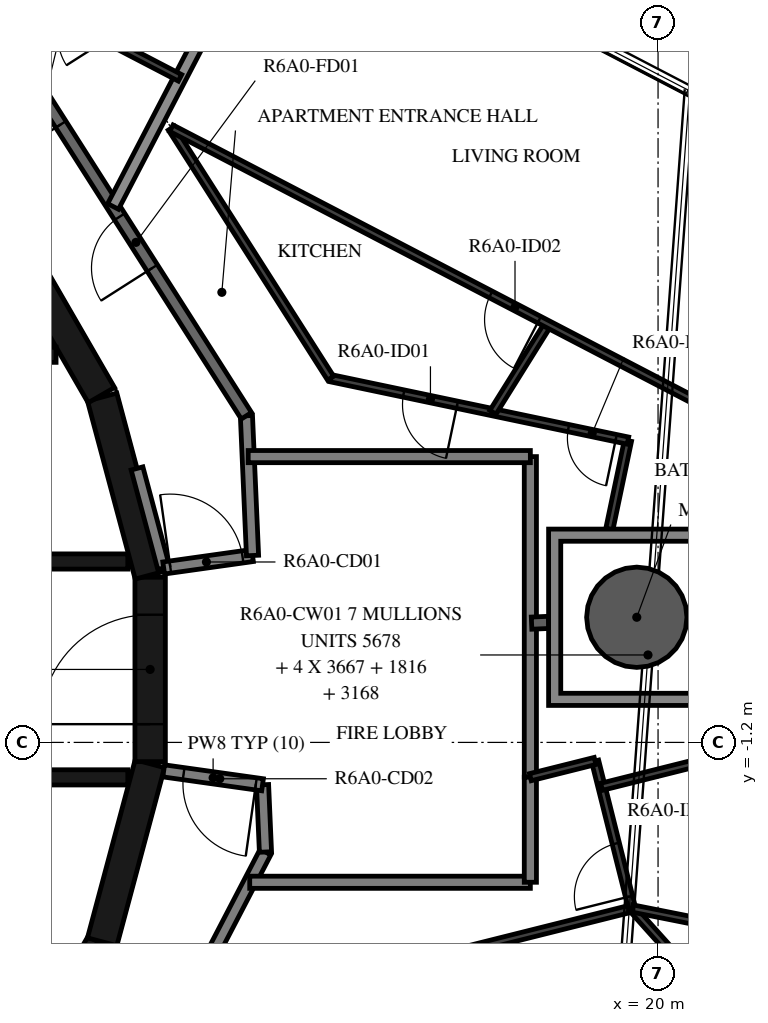
"""IFC4 building model, lengths in metres.
Left out: names, types, materials, properties, quantities, classifications, styles, units other than length and angle.
Written with IfcOpenShell. Run it as: python <this file> out.ifc"""

import sys

from ifc_helpers import new_model, si_unit, direction, frame, frame_2d, origin, origin_2d, place, context, subcontext, project, spatial, polyline, rectangle, hollow_circle, outline, extrude, element, fill, save


model = new_model("IFC4")
c1 = context("Model", 3, precision=1e-05, world=origin(), true_north=direction((0.0, 1.0)))
c2 = subcontext(c1, "Body", "Model", "MODEL_VIEW")
j1 = project(units=[si_unit("LENGTHUNIT", "METRE"), si_unit("PLANEANGLEUNIT", "RADIAN")], contexts=[c1])
p1 = place(None, origin())
s1 = spatial("IfcSite", under=j1, at=p1, CompositionType="ELEMENT")
p2 = place(p1, origin())
s2 = spatial("IfcBuilding", under=s1, at=p2, CompositionType="ELEMENT")
p3 = place(p2, frame((0.0, 0.0, 233.7)))
s3 = spatial("IfcBuildingStorey", under=s2, at=p3, CompositionType="ELEMENT", Elevation=233.7)
p4 = place(p3, frame((19.65, 0.858, -0.38), z_axis=(0.0, 0.0, 1.0), x_axis=(1.0, 0.0, 0.0)))
e1 = element("IfcColumn", 1, at=p4, inside=s3, PredefinedType="COLUMN", context=c2, shape_type="SweptSolid", body=[
    extrude(hollow_circle(Radius=0.825, WallThickness=0.04, at=origin_2d()), origin(), (0.0, 0.0, 1.0), 3.5),
])
for number, where, z_axis, x_axis in (
    (2, (9.329, -7.137, 0.0), (0.0, 0.0, 1.0), (0.5, 0.866, 0.0)),
    (3, (10.858, -4.479, 0.0), (0.0, 0.0, 1.0), (0.259, 0.966, 0.0)),
):
    element("IfcWall", number, at=place(p3, frame(where, z_axis=z_axis, x_axis=x_axis)), inside=s3, PredefinedType="SHEAR", context=c2, shape_type="SweptSolid", body=[
        extrude(rectangle(XDim=3.033, YDim=0.5, at=frame_2d((1.516, 0.0))), origin(), (0.0, 0.0, 1.0), 3.12),
    ])
p5 = place(p3, frame((11.647, -1.516, 0.0), z_axis=(0.0, 0.0, 1.0), x_axis=(0.0, 1.0, 0.0)))
e4 = element("IfcWall", 4, at=p5, inside=s3, PredefinedType="SHEAR", context=c2, shape_type="SweptSolid", body=[
    extrude(rectangle(XDim=3.033, YDim=0.5, at=frame_2d((1.516, 0.0))), origin(), (0.0, 0.0, 1.0), 3.12),
])
p6 = place(p5, frame((0.616, 0.0, 0.0)))
e5 = element("IfcOpeningElement", 5, at=p6, cuts=e4, PredefinedType="OPENING", context=c2, shape_type="SweptSolid", body=[
    extrude(rectangle(XDim=1.8, YDim=2.1, at=frame_2d((0.9, 1.05))), frame((0.0, 0.26, 0.0), z_axis=(0.0, -1.0, 0.0), x_axis=(1.0, 0.0, 0.0)), (0.0, 0.0, 1.0), 0.52),
])
for number, where, z_axis, x_axis in (
    (6, (11.643, 1.55, 0.0), (0.0, 0.0, 1.0), (-0.259, 0.966, 0.0)),
    (7, (10.845, 4.51, 0.0), (0.0, 0.0, 1.0), (-0.5, 0.866, 0.0)),
):
    element("IfcWall", number, at=place(p3, frame(where, z_axis=z_axis, x_axis=x_axis)), inside=s3, PredefinedType="SHEAR", context=c2, shape_type="SweptSolid", body=[
        extrude(rectangle(XDim=3.033, YDim=0.5, at=frame_2d((1.516, 0.0))), origin(), (0.0, 0.0, 1.0), 3.12),
    ])
p7 = place(p3, frame((7.0, 5.175, 0.0), z_axis=(0.0, 0.0, 1.0), x_axis=(1.0, 0.0, 0.0)))
e8 = element("IfcWall", 8, at=p7, inside=s3, PredefinedType="SHEAR", context=c2, shape_type="SweptSolid", body=[
    extrude(rectangle(XDim=3.1, YDim=0.25, at=frame_2d((1.55, 0.0))), origin(), (0.0, 0.0, 1.0), 3.12),
])
p8 = place(p3, frame((3.35, 1.775, 0.0), z_axis=(0.0, 0.0, 1.0), x_axis=(1.0, 0.0, 0.0)))
e9 = element("IfcWall", 9, at=p8, inside=s3, PredefinedType="SHEAR", context=c2, shape_type="SweptSolid", body=[
    extrude(rectangle(XDim=7.93, YDim=0.25, at=frame_2d((3.965, 0.0))), origin(), (0.0, 0.0, 1.0), 3.12),
])
p9 = place(p8, frame((0.35, 0.0, 0.0)))
e10 = element("IfcOpeningElement", 10, at=p9, cuts=e9, PredefinedType="OPENING", context=c2, shape_type="SweptSolid", body=[
    extrude(rectangle(XDim=1.2, YDim=2.4, at=frame_2d((0.6, 1.2))), frame((0.0, 0.135, 0.0), z_axis=(0.0, -1.0, 0.0), x_axis=(1.0, 0.0, 0.0)), (0.0, 0.0, 1.0), 0.27),
])
p10 = place(p8, frame((2.5, 0.0, 0.0)))
e11 = element("IfcOpeningElement", 11, at=p10, cuts=e9, PredefinedType="OPENING", context=c2, shape_type="SweptSolid", body=[
    extrude(rectangle(XDim=1.2, YDim=2.4, at=frame_2d((0.6, 1.2))), frame((0.0, 0.135, 0.0), z_axis=(0.0, -1.0, 0.0), x_axis=(1.0, 0.0, 0.0)), (0.0, 0.0, 1.0), 0.27),
])
p11 = place(p8, frame((4.8, 0.0, 0.0)))
e12 = element("IfcOpeningElement", 12, at=p11, cuts=e9, PredefinedType="OPENING", context=c2, shape_type="SweptSolid", body=[
    extrude(rectangle(XDim=0.9, YDim=2.1, at=frame_2d((0.45, 1.05))), frame((0.0, 0.135, 0.0), z_axis=(0.0, -1.0, 0.0), x_axis=(1.0, 0.0, 0.0)), (0.0, 0.0, 1.0), 0.27),
])
p12 = place(p3, frame((3.35, -1.775, 0.0), z_axis=(0.0, 0.0, 1.0), x_axis=(1.0, 0.0, 0.0)))
e13 = element("IfcWall", 13, at=p12, inside=s3, PredefinedType="SHEAR", context=c2, shape_type="SweptSolid", body=[
    extrude(rectangle(XDim=7.93, YDim=0.25, at=frame_2d((3.965, 0.0))), origin(), (0.0, 0.0, 1.0), 3.12),
])
p13 = place(p12, frame((0.4, 0.0, 0.0)))
e14 = element("IfcOpeningElement", 14, at=p13, cuts=e13, PredefinedType="OPENING", context=c2, shape_type="SweptSolid", body=[
    extrude(rectangle(XDim=1.1, YDim=2.4, at=frame_2d((0.55, 1.2))), frame((0.0, 0.135, 0.0), z_axis=(0.0, -1.0, 0.0), x_axis=(1.0, 0.0, 0.0)), (0.0, 0.0, 1.0), 0.27),
])
p14 = place(p12, frame((2.55, 0.0, 0.0)))
e15 = element("IfcOpeningElement", 15, at=p14, cuts=e13, PredefinedType="OPENING", context=c2, shape_type="SweptSolid", body=[
    extrude(rectangle(XDim=1.1, YDim=2.4, at=frame_2d((0.55, 1.2))), frame((0.0, 0.135, 0.0), z_axis=(0.0, -1.0, 0.0), x_axis=(1.0, 0.0, 0.0)), (0.0, 0.0, 1.0), 0.27),
])
p15 = place(p12, frame((4.7, 0.0, 0.0)))
e16 = element("IfcOpeningElement", 16, at=p15, cuts=e13, PredefinedType="OPENING", context=c2, shape_type="SweptSolid", body=[
    extrude(rectangle(XDim=1.1, YDim=2.4, at=frame_2d((0.55, 1.2))), frame((0.0, 0.135, 0.0), z_axis=(0.0, -1.0, 0.0), x_axis=(1.0, 0.0, 0.0)), (0.0, 0.0, 1.0), 0.27),
])
p16 = place(p3, frame((11.87, 1.668, 0.0), z_axis=(0.0, 0.0, 1.0), x_axis=(-0.258836880648, 0.965921047093, 0.0)))
e17 = element("IfcWall", 17, at=p16, inside=s3, PredefinedType="STANDARD", context=c2, shape_type="SweptSolid", body=[
    extrude(rectangle(XDim=1.695, YDim=0.2, at=frame_2d((0.848, 0.0))), origin(), (0.0, 0.0, 1.0), 3.12),
])
p17 = place(p3, frame((11.87, 1.668, 0.0), z_axis=(0.0, 0.0, 1.0), x_axis=(0.990267985606, 0.139173692496, 0.0)))
e18 = element("IfcWall", 18, at=p17, inside=s3, PredefinedType="STANDARD", context=c2, shape_type="SweptSolid", body=[
    extrude(rectangle(XDim=1.475, YDim=0.2, at=frame_2d((0.738, 0.0))), origin(), (0.0, 0.0, 1.0), 3.12),
])
p18 = place(p17, frame((0.11, 0.0, 0.0)))
e19 = element("IfcOpeningElement", 19, at=p18, cuts=e18, PredefinedType="OPENING", context=c2, shape_type="SweptSolid", body=[
    extrude(rectangle(XDim=1.2, YDim=2.1, at=frame_2d((0.6, 1.05))), frame((0.0, 0.11, 0.0), z_axis=(0.0, -1.0, 0.0), x_axis=(1.0, 0.0, 0.0)), (0.0, 0.0, 1.0), 0.22),
])
p19 = place(p3, frame((13.331, 1.874, 0.0), z_axis=(0.0, 0.0, 1.0), x_axis=(-0.043621457762, 0.999048131184, 0.0)))
e20 = element("IfcWall", 20, at=p19, inside=s3, PredefinedType="STANDARD", context=c2, shape_type="SweptSolid", body=[
    extrude(rectangle(XDim=2.3, YDim=0.2, at=frame_2d((1.15, 0.0))), origin(), (0.0, 0.0, 1.0), 3.12),
])
p20 = place(p3, frame((13.231, 4.172, 0.0), z_axis=(0.0, 0.0, 1.0), x_axis=(-0.537304397561, 0.843388394728, 0.0)))
e21 = element("IfcWall", 21, at=p20, inside=s3, PredefinedType="STANDARD", context=c2, shape_type="SweptSolid", body=[
    extrude(rectangle(XDim=7.181, YDim=0.2, at=frame_2d((3.59, 0.0))), origin(), (0.0, 0.0, 1.0), 3.12),
])
p21 = place(p20, frame((2.881, 0.0, 0.0)))
e22 = element("IfcOpeningElement", 22, at=p21, cuts=e21, PredefinedType="OPENING", context=c2, shape_type="SweptSolid", body=[
    extrude(rectangle(XDim=1.0, YDim=2.1, at=frame_2d((0.5, 1.05))), frame((0.0, 0.11, 0.0), z_axis=(0.0, -1.0, 0.0), x_axis=(1.0, 0.0, 0.0)), (0.0, 0.0, 1.0), 0.22),
])
p22 = place(p20, frame((5.681, 0.0, 0.0)))
e23 = element("IfcOpeningElement", 23, at=p22, cuts=e21, PredefinedType="OPENING", context=c2, shape_type="SweptSolid", body=[
    extrude(rectangle(XDim=1.0, YDim=2.1, at=frame_2d((0.5, 1.05))), frame((0.0, 0.11, 0.0), z_axis=(0.0, -1.0, 0.0), x_axis=(1.0, 0.0, 0.0)), (0.0, 0.0, 1.0), 0.22),
])
p23 = place(p3, frame((10.228, -9.372, 0.0), z_axis=(0.0, 0.0, 1.0), x_axis=(0.461759464021, 0.887005184532, 0.0)))
e24 = element("IfcWall", 24, at=p23, inside=s3, PredefinedType="STANDARD", context=c2, shape_type="SweptSolid", body=[
    extrude(rectangle(XDim=7.181, YDim=0.2, at=frame_2d((3.591, 0.0))), origin(), (0.0, 0.0, 1.0), 3.12),
])
p24 = place(p3, frame((13.544, -3.003, 0.0), z_axis=(0.0, 0.0, 1.0), x_axis=(-0.043666917606, 0.999046145234, 0.0)))
e25 = element("IfcWall", 25, at=p24, inside=s3, PredefinedType="STANDARD", context=c2, shape_type="SweptSolid", body=[
    extrude(rectangle(XDim=1.107, YDim=0.2, at=frame_2d((0.553, 0.0))), origin(), (0.0, 0.0, 1.0), 3.12),
])
p25 = place(p3, frame((13.496, -1.897, 0.0), z_axis=(0.0, 0.0, 1.0), x_axis=(-0.99026234641, 0.139213811391, 0.0)))
e26 = element("IfcWall", 26, at=p25, inside=s3, PredefinedType="STANDARD", context=c2, shape_type="SweptSolid", body=[
    extrude(rectangle(XDim=1.641, YDim=0.2, at=frame_2d((0.821, 0.0))), origin(), (0.0, 0.0, 1.0), 3.12),
])
p26 = place(p25, frame((0.11, 0.0, 0.0)))
e27 = element("IfcOpeningElement", 27, at=p26, cuts=e26, PredefinedType="OPENING", context=c2, shape_type="SweptSolid", body=[
    extrude(rectangle(XDim=1.2, YDim=2.1, at=frame_2d((0.6, 1.05))), frame((0.0, 0.11, 0.0), z_axis=(0.0, -1.0, 0.0), x_axis=(1.0, 0.0, 0.0)), (0.0, 0.0, 1.0), 0.22),
])
p27 = place(p3, frame((17.9, -1.772, 0.0), z_axis=(0.0, 0.0, 1.0), x_axis=(0.0, 1.0, 0.0)))
e28 = element("IfcWall", 28, at=p27, inside=s3, PredefinedType="STANDARD", context=c2, shape_type="SweptSolid", body=[
    extrude(rectangle(XDim=5.272, YDim=0.2, at=frame_2d((2.636, 0.0))), origin(), (0.0, 0.0, 1.0), 3.12),
])
p28 = place(p3, frame((17.9, 3.5, 0.0), z_axis=(0.0, 0.0, 1.0), x_axis=(-1.0, 0.0, 0.0)))
e29 = element("IfcWall", 29, at=p28, inside=s3, PredefinedType="STANDARD", context=c2, shape_type="SweptSolid", body=[
    extrude(rectangle(XDim=4.64, YDim=0.2, at=frame_2d((2.32, 0.0))), origin(), (0.0, 0.0, 1.0), 3.12),
])
p29 = place(p3, frame((13.285, -3.5, 0.0), z_axis=(0.0, 0.0, 1.0), x_axis=(1.0, 0.0, 0.0)))
e30 = element("IfcWall", 30, at=p29, inside=s3, PredefinedType="STANDARD", context=c2, shape_type="SweptSolid", body=[
    extrude(rectangle(XDim=4.615, YDim=0.2, at=frame_2d((2.308, 0.0))), origin(), (0.0, 0.0, 1.0), 3.12),
])
p30 = place(p3, frame((17.9, -3.5, 0.0), z_axis=(0.0, 0.0, 1.0), x_axis=(0.0, 1.0, 0.0)))
e31 = element("IfcWall", 31, at=p30, inside=s3, PredefinedType="STANDARD", context=c2, shape_type="SweptSolid", body=[
    extrude(rectangle(XDim=1.728, YDim=0.2, at=frame_2d((0.864, 0.0))), origin(), (0.0, 0.0, 1.0), 3.12),
])
p31 = place(p3, frame((13.801, 12.922, 0.0), z_axis=(0.0, 0.0, 1.0), x_axis=(-0.461726485624, -0.887022351733, 0.0)))
e32 = element("IfcWall", 32, at=p31, inside=s3, PredefinedType="STANDARD", context=c2, shape_type="SweptSolid", body=[
    extrude(rectangle(XDim=5.984, YDim=0.2, at=frame_2d((2.992, 0.0))), origin(), (0.0, 0.0, 1.0), 2.73),
])
p32 = place(p3, frame((17.92, 0.761, 0.0), z_axis=(0.0, 0.0, 1.0), x_axis=(0.999051221661, 0.04355061995, 0.0)))
e33 = element("IfcWall", 33, at=p32, inside=s3, PredefinedType="STANDARD", context=c2, shape_type="SweptSolid", body=[
    extrude(rectangle(XDim=0.28, YDim=0.2, at=frame_2d((0.14, 0.0))), origin(), (0.0, 0.0, 1.0), 3.12),
])
p33 = place(p3, frame((19.199, 2.308, 0.0), z_axis=(0.0, 0.0, 1.0), x_axis=(0.205580140246, 0.978640284239, 0.0)))
e34 = element("IfcWall", 34, at=p33, inside=s3, PredefinedType="PARTITIONING", context=c2, shape_type="SweptSolid", body=[
    extrude(rectangle(XDim=1.487, YDim=0.12, at=frame_2d((0.743, 0.0))), origin(), (0.0, 0.0, 1.0), 3.12),
])
p34 = place(p3, frame((19.505, 3.763, 0.0), z_axis=(0.0, 0.0, 1.0), x_axis=(-0.978660081285, 0.205485876157, 0.0)))
e35 = element("IfcWall", 35, at=p34, inside=s3, PredefinedType="PARTITIONING", context=c2, shape_type="SweptSolid", body=[
    extrude(rectangle(XDim=4.996, YDim=0.12, at=frame_2d((2.498, 0.0))), origin(), (0.0, 0.0, 1.0), 3.12),
])
p35 = place(p34, frame((0.2, 0.0, 0.0)))
e36 = element("IfcOpeningElement", 36, at=p35, cuts=e35, PredefinedType="OPENING", context=c2, shape_type="SweptSolid", body=[
    extrude(rectangle(XDim=0.8, YDim=2.1, at=frame_2d((0.4, 1.05))), frame((0.0, 0.07, 0.0), z_axis=(0.0, -1.0, 0.0), x_axis=(1.0, 0.0, 0.0)), (0.0, 0.0, 1.0), 0.14),
])
p36 = place(p34, frame((2.869, 0.0, 0.0)))
e37 = element("IfcOpeningElement", 37, at=p36, cuts=e35, PredefinedType="OPENING", context=c2, shape_type="SweptSolid", body=[
    extrude(rectangle(XDim=0.9, YDim=2.1, at=frame_2d((0.45, 1.05))), frame((0.0, 0.07, 0.0), z_axis=(0.0, -1.0, 0.0), x_axis=(1.0, 0.0, 0.0)), (0.0, 0.0, 1.0), 0.14),
])
p37 = place(p3, frame((14.615, 4.79, 0.0), z_axis=(0.0, 0.0, 1.0), x_axis=(-0.537312928062, 0.843382960071, 0.0)))
e38 = element("IfcWall", 38, at=p37, inside=s3, PredefinedType="PARTITIONING", context=c2, shape_type="SweptSolid", body=[
    extrude(rectangle(XDim=4.875, YDim=0.12, at=frame_2d((2.437, 0.0))), origin(), (0.0, 0.0, 1.0), 3.12),
])
p38 = place(p3, frame((18.189, 5.677, 0.0), z_axis=(0.0, 0.0, 1.0), x_axis=(-0.529639004581, -0.848223157445, 0.0)))
e39 = element("IfcWall", 39, at=p38, inside=s3, PredefinedType="PARTITIONING", context=c2, shape_type="SweptSolid", body=[
    extrude(rectangle(XDim=1.707, YDim=0.12, at=frame_2d((0.854, 0.0))), origin(), (0.0, 0.0, 1.0), 3.12),
])
p39 = place(p3, frame((21.085, 4.169, 0.0), z_axis=(0.0, 0.0, 1.0), x_axis=(-0.887017373034, 0.461736050071, 0.0)))
e40 = element("IfcWall", 40, at=p39, inside=s3, PredefinedType="PARTITIONING", context=c2, shape_type="SweptSolid", body=[
    extrude(rectangle(XDim=10.247, YDim=0.12, at=frame_2d((5.123, 0.0))), origin(), (0.0, 0.0, 1.0), 3.12),
])
p40 = place(p39, frame((3.425, 0.0, 0.0)))
e41 = element("IfcOpeningElement", 41, at=p40, cuts=e40, PredefinedType="OPENING", context=c2, shape_type="SweptSolid", body=[
    extrude(rectangle(XDim=0.9, YDim=2.1, at=frame_2d((0.45, 1.05))), frame((0.0, 0.07, 0.0), z_axis=(0.0, -1.0, 0.0), x_axis=(1.0, 0.0, 0.0)), (0.0, 0.0, 1.0), 0.14),
])
p41 = place(p3, frame((12.139, 9.729, 0.0), z_axis=(0.0, 0.0, 1.0), x_axis=(-0.887046876331, 0.461679368383, 0.0)))
e42 = element("IfcWall", 42, at=p41, inside=s3, PredefinedType="PARTITIONING", context=c2, shape_type="SweptSolid", body=[
    extrude(rectangle(XDim=1.13, YDim=0.12, at=frame_2d((0.565, 0.0))), origin(), (0.0, 0.0, 1.0), 3.12),
])
p42 = place(p3, frame((14.029, -5.32, 0.0), z_axis=(0.0, 0.0, 1.0), x_axis=(0.969999099814, 0.243108507378, 0.0)))
e43 = element("IfcWall", 43, at=p42, inside=s3, PredefinedType="PARTITIONING", context=c2, shape_type="SweptSolid", body=[
    extrude(rectangle(XDim=5.715, YDim=0.12, at=frame_2d((2.857, 0.0))), origin(), (0.0, 0.0, 1.0), 3.12),
])
p43 = place(p3, frame((19.573, -3.93, 0.0), z_axis=(0.0, 0.0, 1.0), x_axis=(-0.243155959183, 0.96998720585, 0.0)))
e44 = element("IfcWall", 44, at=p43, inside=s3, PredefinedType="PARTITIONING", context=c2, shape_type="SweptSolid", body=[
    extrude(rectangle(XDim=2.5, YDim=0.12, at=frame_2d((1.25, 0.0))), origin(), (0.0, 0.0, 1.0), 3.12),
])
p44 = place(p43, frame((0.2, 0.0, 0.0)))
e45 = element("IfcOpeningElement", 45, at=p44, cuts=e44, PredefinedType="OPENING", context=c2, shape_type="SweptSolid", body=[
    extrude(rectangle(XDim=0.9, YDim=2.1, at=frame_2d((0.45, 1.05))), frame((0.0, 0.07, 0.0), z_axis=(0.0, -1.0, 0.0), x_axis=(1.0, 0.0, 0.0)), (0.0, 0.0, 1.0), 0.14),
])
p45 = place(p3, frame((18.965, -1.505, 0.0), z_axis=(0.0, 0.0, 1.0), x_axis=(-0.969998406835, -0.243111272339, 0.0)))
e46 = element("IfcWall", 46, at=p45, inside=s3, PredefinedType="PARTITIONING", context=c2, shape_type="SweptSolid", body=[
    extrude(rectangle(XDim=1.098, YDim=0.12, at=frame_2d((0.549, 0.0))), origin(), (0.0, 0.0, 1.0), 3.12),
])
p46 = place(p3, frame((22.284, -6.949, 0.0), z_axis=(0.0, 0.0, 1.0), x_axis=(-0.668156639948, 0.744020634454, 0.0)))
e47 = element("IfcWall", 47, at=p46, inside=s3, PredefinedType="PARTITIONING", context=c2, shape_type="SweptSolid", body=[
    extrude(rectangle(XDim=4.058, YDim=0.12, at=frame_2d((2.029, 0.0))), origin(), (0.0, 0.0, 1.0), 3.12),
])
p47 = place(p46, frame((0.2, 0.0, 0.0)))
e48 = element("IfcOpeningElement", 48, at=p47, cuts=e47, PredefinedType="OPENING", context=c2, shape_type="SweptSolid", body=[
    extrude(rectangle(XDim=0.9, YDim=2.1, at=frame_2d((0.45, 1.05))), frame((0.0, 0.07, 0.0), z_axis=(0.0, -1.0, 0.0), x_axis=(1.0, 0.0, 0.0)), (0.0, 0.0, 1.0), 0.14),
])
p48 = place(p3, frame((25.021, -5.015, 0.0), z_axis=(0.0, 0.0, 1.0), x_axis=(-0.98075605246, 0.195237203328, 0.0)))
e49 = element("IfcWall", 49, at=p48, inside=s3, PredefinedType="PARTITIONING", context=c2, shape_type="SweptSolid", body=[
    extrude(rectangle(XDim=5.556, YDim=0.12, at=frame_2d((2.778, 0.0))), origin(), (0.0, 0.0, 1.0), 3.12),
])
p49 = place(p3, frame((27.616, 0.212, 0.0), z_axis=(0.0, 0.0, 1.0), x_axis=(-0.969995609005, -0.243122435227, 0.0)))
e50 = element("IfcWall", 50, at=p49, inside=s3, PredefinedType="PARTITIONING", context=c2, shape_type="SweptSolid", body=[
    extrude(rectangle(XDim=8.81, YDim=0.12, at=frame_2d((4.405, 0.0))), origin(), (0.0, 0.0, 1.0), 3.12),
])
p50 = place(p49, frame((2.5, 0.0, 0.0)))
e51 = element("IfcOpeningElement", 51, at=p50, cuts=e50, PredefinedType="OPENING", context=c2, shape_type="SweptSolid", body=[
    extrude(rectangle(XDim=0.8, YDim=2.1, at=frame_2d((0.4, 1.05))), frame((0.0, 0.07, 0.0), z_axis=(0.0, -1.0, 0.0), x_axis=(1.0, 0.0, 0.0)), (0.0, 0.0, 1.0), 0.14),
])
p51 = place(p3, origin())
e52 = element("IfcWall", 52, at=p51, inside=s3, PredefinedType="STANDARD", context=c2, shape_type="SweptSolid", body=[
    extrude(outline(polyline([(21.1, 2.308), (21.1, -0.592), (18.2, -0.592), (18.2, 2.308), (21.1, 2.308)]), holes=[polyline([(18.4, -0.392), (20.9, -0.392), (20.9, 2.108), (18.4, 2.108), (18.4, -0.392)])]), origin(), (0.0, 0.0, 1.0), 3.12),
])
p52 = place(p6, origin())
e53 = element("IfcDoor", 53, at=p52, inside=s3, OperationType="DOUBLE_DOOR_SINGLE_SWING", PredefinedType="DOOR", context=c2, shape_type="SweptSolid", body=[
    extrude(rectangle(XDim=1.8, YDim=2.1, at=frame_2d((0.9, 1.05))), frame((0.0, 0.025, 0.0), z_axis=(0.0, -1.0, 0.0), x_axis=(1.0, 0.0, 0.0)), (0.0, 0.0, 1.0), 0.05),
])
fill(e5, e53)
p53 = place(p21, origin())
e54 = element("IfcDoor", 54, at=p53, inside=s3, OperationType="SINGLE_SWING_LEFT", PredefinedType="DOOR", context=c2, shape_type="SweptSolid", body=[
    extrude(rectangle(XDim=1.0, YDim=2.1, at=frame_2d((0.5, 1.05))), frame((0.0, 0.025, 0.0), z_axis=(0.0, -1.0, 0.0), x_axis=(1.0, 0.0, 0.0)), (0.0, 0.0, 1.0), 0.05),
])
fill(e22, e54)
p54 = place(p35, origin())
e55 = element("IfcDoor", 55, at=p54, inside=s3, OperationType="SINGLE_SWING_LEFT", PredefinedType="DOOR", context=c2, shape_type="SweptSolid", body=[
    extrude(rectangle(XDim=0.8, YDim=2.1, at=frame_2d((0.4, 1.05))), frame((0.0, 0.025, 0.0), z_axis=(0.0, -1.0, 0.0), x_axis=(1.0, 0.0, 0.0)), (0.0, 0.0, 1.0), 0.05),
])
fill(e36, e55)
p55 = place(p36, origin())
e56 = element("IfcDoor", 56, at=p55, inside=s3, OperationType="SINGLE_SWING_LEFT", PredefinedType="DOOR", context=c2, shape_type="SweptSolid", body=[
    extrude(rectangle(XDim=0.9, YDim=2.1, at=frame_2d((0.45, 1.05))), frame((0.0, 0.025, 0.0), z_axis=(0.0, -1.0, 0.0), x_axis=(1.0, 0.0, 0.0)), (0.0, 0.0, 1.0), 0.05),
])
fill(e37, e56)
p56 = place(p40, origin())
e57 = element("IfcDoor", 57, at=p56, inside=s3, OperationType="SINGLE_SWING_LEFT", PredefinedType="DOOR", context=c2, shape_type="SweptSolid", body=[
    extrude(rectangle(XDim=0.9, YDim=2.1, at=frame_2d((0.45, 1.05))), frame((0.0, 0.025, 0.0), z_axis=(0.0, -1.0, 0.0), x_axis=(1.0, 0.0, 0.0)), (0.0, 0.0, 1.0), 0.05),
])
fill(e41, e57)
p57 = place(p22, origin())
e58 = element("IfcDoor", 58, at=p57, inside=s3, OperationType="SINGLE_SWING_LEFT", PredefinedType="DOOR", context=c2, shape_type="SweptSolid", body=[
    extrude(rectangle(XDim=1.0, YDim=2.1, at=frame_2d((0.5, 1.05))), frame((0.0, 0.025, 0.0), z_axis=(0.0, -1.0, 0.0), x_axis=(1.0, 0.0, 0.0)), (0.0, 0.0, 1.0), 0.05),
])
fill(e23, e58)
p58 = place(p44, origin())
e59 = element("IfcDoor", 59, at=p58, inside=s3, OperationType="SINGLE_SWING_RIGHT", PredefinedType="DOOR", context=c2, shape_type="SweptSolid", body=[
    extrude(rectangle(XDim=0.9, YDim=2.1, at=frame_2d((0.45, 1.05))), frame((0.0, 0.025, 0.0), z_axis=(0.0, -1.0, 0.0), x_axis=(1.0, 0.0, 0.0)), (0.0, 0.0, 1.0), 0.05),
])
fill(e45, e59)
p59 = place(p18, origin())
e60 = element("IfcDoor", 60, at=p59, inside=s3, OperationType="DOUBLE_DOOR_SINGLE_SWING", PredefinedType="DOOR", context=c2, shape_type="SweptSolid", body=[
    extrude(rectangle(XDim=1.2, YDim=2.1, at=frame_2d((0.6, 1.05))), frame((0.0, 0.025, 0.0), z_axis=(0.0, -1.0, 0.0), x_axis=(1.0, 0.0, 0.0)), (0.0, 0.0, 1.0), 0.05),
])
fill(e19, e60)
p60 = place(p26, origin())
e61 = element("IfcDoor", 61, at=p60, inside=s3, OperationType="DOUBLE_DOOR_SINGLE_SWING", PredefinedType="DOOR", context=c2, shape_type="SweptSolid", body=[
    extrude(rectangle(XDim=1.2, YDim=2.1, at=frame_2d((0.6, 1.05))), frame((0.0, 0.025, 0.0), z_axis=(0.0, -1.0, 0.0), x_axis=(1.0, 0.0, 0.0)), (0.0, 0.0, 1.0), 0.05),
])
fill(e27, e61)
save(model, sys.argv[1])
